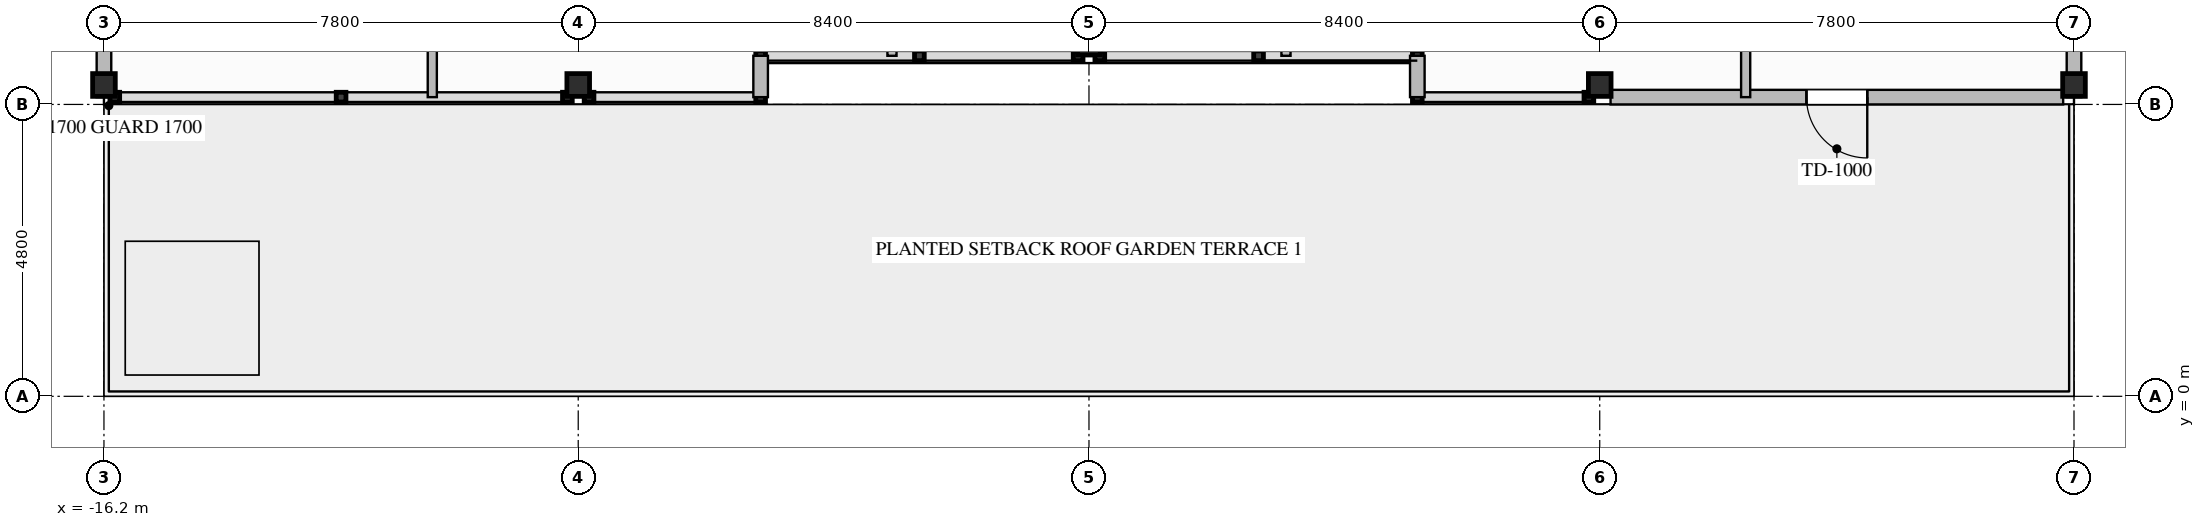
"""IFC4 building model, lengths in metres.
Left out: names, types, materials, properties, quantities, classifications, styles, units other than length and angle.
Written with IfcOpenShell. Run it as: python <this file> out.ifc"""

import sys

from ifc_helpers import new_model, si_unit, direction, frame, frame_2d, origin, origin_2d, place, context, subcontext, project, spatial, rectangle, i_section, extrude, element, fill, save


model = new_model("IFC4")
c1 = context("Model", 3, precision=1e-05, world=origin(), true_north=direction((0.0, 1.0)))
c2 = subcontext(c1, "Body", "Model", "MODEL_VIEW")
j1 = project(units=[si_unit("LENGTHUNIT", "METRE"), si_unit("PLANEANGLEUNIT", "RADIAN")], contexts=[c1])
p1 = place(None, origin())
s1 = spatial("IfcSite", under=j1, at=p1, CompositionType="ELEMENT")
p2 = place(p1, origin())
s2 = spatial("IfcBuilding", under=s1, at=p2, CompositionType="ELEMENT")
p3 = place(p2, frame((0.0, 0.0, 265.0)))
s3 = spatial("IfcBuildingStorey", under=s2, at=p3, CompositionType="ELEMENT", Elevation=265.0)
for number, where, z_axis, x_axis in (
    (1, (-16.2, 5.12, -0.26), (0.0, 0.0, 1.0), (0.0, 1.0, 0.0)),
    (2, (-8.4, 5.12, -0.26), (0.0, 0.0, 1.0), (0.0, 1.0, 0.0)),
    (3, (0.0, 5.8, -0.26), (0.0, 0.0, 1.0), (0.0, 1.0, 0.0)),
    (4, (8.4, 5.12, -0.26), (0.0, 0.0, 1.0), (0.0, 1.0, 0.0)),
    (5, (16.2, 5.12, -0.26), (0.0, 0.0, 1.0), (0.0, 1.0, 0.0)),
):
    element("IfcColumn", number, at=place(p3, frame(where, z_axis=z_axis, x_axis=x_axis)), inside=s3, PredefinedType="COLUMN", context=c2, shape_type="SweptSolid", body=[
        extrude(i_section(OverallWidth=0.374, OverallDepth=0.372, WebThickness=0.016, FlangeThickness=0.026, FilletRadius=0.025, at=origin_2d()), origin(), (0.0, 0.0, 1.0), 3.907),
    ])
p4 = place(p3, frame((16.022, 4.92, 0.0), z_axis=(0.0, 0.0, 1.0), x_axis=(-1.0, 0.0, 0.0)))
e6 = element("IfcWall", 6, at=p4, inside=s3, PredefinedType="STANDARD", context=c2, shape_type="SweptSolid", body=[
    extrude(rectangle(XDim=7.444, YDim=0.24, at=frame_2d((3.722, 0.0))), origin(), (0.0, 0.0, 1.0), 2.853),
])
p5 = place(p4, frame((3.222, 0.0, 0.0)))
e7 = element("IfcOpeningElement", 7, at=p5, cuts=e6, PredefinedType="OPENING", context=c2, shape_type="SweptSolid", body=[
    extrude(rectangle(XDim=1.0, YDim=2.2, at=frame_2d((0.5, 1.1))), frame((0.0, 0.13, 0.0), z_axis=(0.0, -1.0, 0.0), x_axis=(1.0, 0.0, 0.0)), (0.0, 0.0, 1.0), 0.26),
])
for number, where, z_axis, x_axis in (
    (8, (-16.2, 4.92, 0.0), (0.0, 0.0, 1.0), (0.0, 1.0, 0.0)),
    (9, (16.2, 10.8, 0.0), (0.0, 0.0, 1.0), (0.0, -1.0, 0.0)),
):
    element("IfcWall", number, at=place(p3, frame(where, z_axis=z_axis, x_axis=x_axis)), inside=s3, PredefinedType="STANDARD", context=c2, shape_type="SweptSolid", body=[
        extrude(rectangle(XDim=5.88, YDim=0.24, at=frame_2d((2.94, 0.0))), origin(), (0.0, 0.0, 1.0), 2.779),
    ])
for number, where, z_axis, x_axis in (
    (10, (5.4, 4.92, 0.0), (0.0, 0.0, 1.0), (0.0, 1.0, 0.0)),
    (11, (-5.4, 5.6, 0.0), (0.0, 0.0, 1.0), (0.0, -1.0, 0.0)),
):
    element("IfcWall", number, at=place(p3, frame(where, z_axis=z_axis, x_axis=x_axis)), inside=s3, PredefinedType="STANDARD", context=c2, shape_type="SweptSolid", body=[
        extrude(rectangle(XDim=0.68, YDim=0.24, at=frame_2d((0.34, 0.0))), origin(), (0.0, 0.0, 1.0), 3.39),
    ])
p6 = place(p3, frame((-10.8, 4.92, 0.0), z_axis=(0.0, 0.0, 1.0), x_axis=(0.0, 1.0, 0.0)))
e12 = element("IfcWall", 12, at=p6, inside=s3, PredefinedType="PARTITIONING", context=c2, shape_type="SweptSolid", body=[
    extrude(rectangle(XDim=11.03, YDim=0.15, at=frame_2d((5.515, 0.0))), origin(), (0.0, 0.0, 1.0), 3.39),
])
for number, where, z_axis, x_axis in (
    (13, (-3.24, 5.6, 0.0), (0.0, 0.0, 1.0), (0.0, 1.0, 0.0)),
    (14, (3.24, 5.6, 0.0), (0.0, 0.0, 1.0), (0.0, 1.0, 0.0)),
):
    element("IfcWall", number, at=place(p3, frame(where, z_axis=z_axis, x_axis=x_axis)), inside=s3, PredefinedType="PARTITIONING", context=c2, shape_type="SweptSolid", body=[
        extrude(rectangle(XDim=10.35, YDim=0.15, at=frame_2d((5.175, 0.0))), origin(), (0.0, 0.0, 1.0), 3.39),
    ])
p7 = place(p3, frame((10.8, 4.92, 0.0), z_axis=(0.0, 0.0, 1.0), x_axis=(0.0, 1.0, 0.0)))
e15 = element("IfcWall", 15, at=p7, inside=s3, PredefinedType="PARTITIONING", context=c2, shape_type="SweptSolid", body=[
    extrude(rectangle(XDim=11.03, YDim=0.15, at=frame_2d((5.515, 0.0))), origin(), (0.0, 0.0, 1.0), 3.39),
])
p8 = place(p5, origin())
e16 = element("IfcDoor", 16, at=p8, inside=s3, OperationType="SINGLE_SWING_LEFT", PredefinedType="DOOR", context=c2, shape_type="SweptSolid", body=[
    extrude(rectangle(XDim=1.0, YDim=2.2, at=frame_2d((0.5, 1.1))), frame((0.0, 0.025, 0.0), z_axis=(0.0, -1.0, 0.0), x_axis=(1.0, 0.0, 0.0)), (0.0, 0.0, 1.0), 0.05),
])
fill(e7, e16)
save(model, sys.argv[1])
